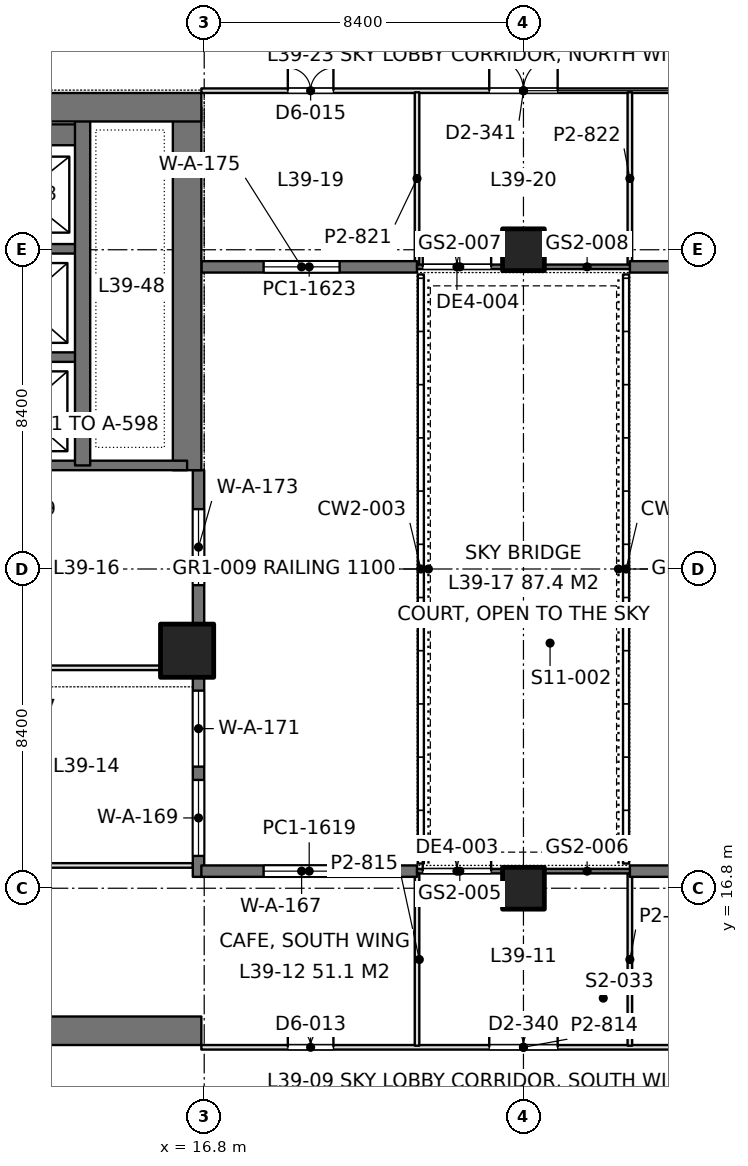
"""IFC4 building model, lengths in metres.
Left out: names, types, materials, properties, quantities, classifications, styles, units other than length and angle.
Written with IfcOpenShell. Run it as: python <this file> out.ifc"""

import sys

from ifc_helpers import new_model, si_unit, direction, frame, frame_2d, origin, origin_2d, place, context, subcontext, project, spatial, rectangle, extrude, element, fill, save


model = new_model("IFC4")
c1 = context("Model", 3, precision=1e-05, world=origin(), true_north=direction((0.0, 1.0)))
c2 = subcontext(c1, "Body", "Model", "MODEL_VIEW")
j1 = project(units=[si_unit("LENGTHUNIT", "METRE"), si_unit("PLANEANGLEUNIT", "RADIAN")], contexts=[c1])
p1 = place(None, origin())
s1 = spatial("IfcSite", under=j1, at=p1, CompositionType="ELEMENT")
p2 = place(p1, origin())
s2 = spatial("IfcBuilding", under=s1, at=p2, CompositionType="ELEMENT")
p3 = place(p2, frame((0.0, 0.0, 173.4)))
s3 = spatial("IfcBuildingStorey", under=s2, at=p3, CompositionType="ELEMENT", Elevation=173.4)
for number, where, z_axis, x_axis in (
    (1, (25.2, 16.8, 0.0), (0.0, 0.0, 1.0), (1.0, 0.0, 0.0)),
    (2, (25.2, 33.6, 0.0), (0.0, 0.0, 1.0), (1.0, 0.0, 0.0)),
):
    element("IfcColumn", number, at=place(p3, frame(where, z_axis=z_axis, x_axis=x_axis)), inside=s3, PredefinedType="COLUMN", context=c2, shape_type="SweptSolid", body=[
        extrude(rectangle(XDim=1.1, YDim=1.1, at=origin_2d()), origin(), (0.0, 0.0, 1.0), 4.2),
    ])
p4 = place(p3, frame((16.35, 23.05, 0.0), z_axis=(0.0, 0.0, 1.0), x_axis=(1.0, 0.0, 0.0)))
e3 = element("IfcColumn", 3, at=p4, inside=s3, PredefinedType="COLUMN", context=c2, shape_type="SweptSolid", body=[
    extrude(rectangle(XDim=1.4, YDim=1.4, at=origin_2d()), origin(), (0.0, 0.0, 1.0), 4.2),
])
p5 = place(p3, frame((-1.125, 13.05, 0.0), z_axis=(0.0, 0.0, 1.0), x_axis=(1.0, 0.0, 0.0)))
e4 = element("IfcWall", 4, at=p5, inside=s3, PredefinedType="SHEAR", context=c2, shape_type="SweptSolid", body=[
    extrude(rectangle(XDim=17.85, YDim=0.75, at=frame_2d((8.925, 0.0))), origin(), (0.0, 0.0, 1.0), 4.2),
])
p6 = place(p5, frame((8.875, 0.0, 0.0)))
e5 = element("IfcOpeningElement", 5, at=p6, cuts=e4, PredefinedType="OPENING", context=c2, shape_type="SweptSolid", body=[
    extrude(rectangle(XDim=1.8, YDim=2.4, at=frame_2d((0.9, 1.2))), frame((0.0, 0.385, 0.0), z_axis=(0.0, -1.0, 0.0), x_axis=(1.0, 0.0, 0.0)), (0.0, 0.0, 1.0), 0.77),
])
p7 = place(p3, frame((-1.125, 37.35, 0.0), z_axis=(0.0, 0.0, 1.0), x_axis=(1.0, 0.0, 0.0)))
e6 = element("IfcWall", 6, at=p7, inside=s3, PredefinedType="SHEAR", context=c2, shape_type="SweptSolid", body=[
    extrude(rectangle(XDim=17.85, YDim=0.75, at=frame_2d((8.925, 0.0))), origin(), (0.0, 0.0, 1.0), 4.2),
])
p8 = place(p7, frame((8.875, 0.0, 0.0)))
e7 = element("IfcOpeningElement", 7, at=p8, cuts=e6, PredefinedType="OPENING", context=c2, shape_type="SweptSolid", body=[
    extrude(rectangle(XDim=1.8, YDim=2.4, at=frame_2d((0.9, 1.2))), frame((0.0, 0.385, 0.0), z_axis=(0.0, -1.0, 0.0), x_axis=(1.0, 0.0, 0.0)), (0.0, 0.0, 1.0), 0.77),
])
p9 = place(p3, frame((16.35, 27.8, 0.0), z_axis=(0.0, 0.0, 1.0), x_axis=(0.0, 1.0, 0.0)))
e8 = element("IfcWall", 8, at=p9, inside=s3, PredefinedType="SHEAR", context=c2, shape_type="SweptSolid", body=[
    extrude(rectangle(XDim=9.55, YDim=0.75, at=frame_2d((4.775, 0.0))), origin(), (0.0, 0.0, 1.0), 4.2),
])
p10 = place(p3, frame((13.6, 27.925, 0.0), z_axis=(0.0, 0.0, 1.0), x_axis=(0.0, 1.0, 0.0)))
e9 = element("IfcWall", 9, at=p10, inside=s3, PredefinedType="SHEAR", context=c2, shape_type="SweptSolid", body=[
    extrude(rectangle(XDim=9.425, YDim=0.4, at=frame_2d((4.712, 0.0))), origin(), (0.0, 0.0, 1.0), 4.2),
])
p11 = place(p3, frame((10.4, 27.925, 0.0), z_axis=(0.0, 0.0, 1.0), x_axis=(1.0, 0.0, 0.0)))
e10 = element("IfcWall", 10, at=p11, inside=s3, PredefinedType="SHEAR", context=c2, shape_type="SweptSolid", body=[
    extrude(rectangle(XDim=5.95, YDim=0.25, at=frame_2d((2.975, 0.0))), origin(), (0.0, 0.0, 1.0), 4.2),
])
for number, where, z_axis, x_axis in (
    (11, (10.4, 30.775, 0.0), (0.0, 0.0, 1.0), (1.0, 0.0, 0.0)),
    (12, (10.4, 33.625, 0.0), (0.0, 0.0, 1.0), (1.0, 0.0, 0.0)),
):
    element("IfcWall", number, at=place(p3, frame(where, z_axis=z_axis, x_axis=x_axis)), inside=s3, PredefinedType="SHEAR", context=c2, shape_type="SweptSolid", body=[
        extrude(rectangle(XDim=3.2, YDim=0.25, at=frame_2d((1.6, 0.0))), origin(), (0.0, 0.0, 1.0), 4.2),
    ])
p12 = place(p3, frame((10.4, 36.625, 0.0), z_axis=(0.0, 0.0, 1.0), x_axis=(1.0, 0.0, 0.0)))
e13 = element("IfcWall", 13, at=p12, inside=s3, PredefinedType="SHEAR", context=c2, shape_type="SweptSolid", body=[
    extrude(rectangle(XDim=3.2, YDim=0.55, at=frame_2d((1.6, 0.0))), origin(), (0.0, 0.0, 1.0), 4.2),
])
p13 = place(p3, frame((16.65, 17.1, 0.0), z_axis=(0.0, 0.0, 1.0), x_axis=(0.0, 1.0, 0.0)))
e14 = element("IfcWall", 14, at=p13, inside=s3, PredefinedType="SOLIDWALL", context=c2, shape_type="SweptSolid", body=[
    extrude(rectangle(XDim=10.7, YDim=0.3, at=frame_2d((5.35, 0.0))), origin(), (0.0, 0.0, 1.0), 4.05),
])
p14 = place(p13, frame((0.55, 0.0, 0.1)))
e15 = element("IfcOpeningElement", 15, at=p14, cuts=e14, PredefinedType="OPENING", context=c2, shape_type="SweptSolid", body=[
    extrude(rectangle(XDim=2.0, YDim=3.0, at=frame_2d((1.0, 1.5))), frame((0.0, 0.16, 0.0), z_axis=(0.0, -1.0, 0.0), x_axis=(1.0, 0.0, 0.0)), (0.0, 0.0, 1.0), 0.32),
])
p15 = place(p13, frame((2.9, 0.0, 0.1)))
e16 = element("IfcOpeningElement", 16, at=p15, cuts=e14, PredefinedType="OPENING", context=c2, shape_type="SweptSolid", body=[
    extrude(rectangle(XDim=2.0, YDim=3.0, at=frame_2d((1.0, 1.5))), frame((0.0, 0.16, 0.0), z_axis=(0.0, -1.0, 0.0), x_axis=(1.0, 0.0, 0.0)), (0.0, 0.0, 1.0), 0.32),
])
p16 = place(p13, frame((7.675, 0.0, 0.1)))
e17 = element("IfcOpeningElement", 17, at=p16, cuts=e14, PredefinedType="OPENING", context=c2, shape_type="SweptSolid", body=[
    extrude(rectangle(XDim=2.0, YDim=3.0, at=frame_2d((1.0, 1.5))), frame((0.0, 0.16, 0.0), z_axis=(0.0, -1.0, 0.0), x_axis=(1.0, 0.0, 0.0)), (0.0, 0.0, 1.0), 0.32),
])
p17 = place(p3, frame((16.725, 17.25, 0.0), z_axis=(0.0, 0.0, 1.0), x_axis=(1.0, 0.0, 0.0)))
e18 = element("IfcWall", 18, at=p17, inside=s3, PredefinedType="SOLIDWALL", context=c2, shape_type="SweptSolid", body=[
    extrude(rectangle(XDim=5.675, YDim=0.3, at=frame_2d((2.837, 0.0))), origin(), (0.0, 0.0, 1.0), 4.05),
])
p18 = place(p17, frame((1.637, 0.0, 0.1)))
e19 = element("IfcOpeningElement", 19, at=p18, cuts=e18, PredefinedType="OPENING", context=c2, shape_type="SweptSolid", body=[
    extrude(rectangle(XDim=2.0, YDim=3.0, at=frame_2d((1.0, 1.5))), frame((0.0, 0.16, 0.0), z_axis=(0.0, -1.0, 0.0), x_axis=(1.0, 0.0, 0.0)), (0.0, 0.0, 1.0), 0.32),
])
p19 = place(p3, frame((22.4, 17.25, 0.0), z_axis=(0.0, 0.0, 1.0), x_axis=(1.0, 0.0, 0.0)))
e20 = element("IfcWall", 20, at=p19, inside=s3, PredefinedType="SOLIDWALL", context=c2, shape_type="SweptSolid", body=[
    extrude(rectangle(XDim=2.25, YDim=0.12, at=frame_2d((1.125, 0.0))), origin(), (0.0, 0.0, 1.0), 4.05),
])
p20 = place(p19, frame((0.15, 0.0, 0.0)))
e21 = element("IfcOpeningElement", 21, at=p20, cuts=e20, PredefinedType="OPENING", context=c2, shape_type="SweptSolid", body=[
    extrude(rectangle(XDim=1.8, YDim=2.4, at=frame_2d((0.9, 1.2))), frame((0.0, 0.07, 0.0), z_axis=(0.0, -1.0, 0.0), x_axis=(1.0, 0.0, 0.0)), (0.0, 0.0, 1.0), 0.14),
])
p21 = place(p3, frame((25.75, 17.25, 0.0), z_axis=(0.0, 0.0, 1.0), x_axis=(1.0, 0.0, 0.0)))
e22 = element("IfcWall", 22, at=p21, inside=s3, PredefinedType="SOLIDWALL", context=c2, shape_type="SweptSolid", body=[
    extrude(rectangle(XDim=2.25, YDim=0.12, at=frame_2d((1.125, 0.0))), origin(), (0.0, 0.0, 1.0), 4.05),
])
p22 = place(p3, frame((28.0, 17.25, 0.0), z_axis=(0.0, 0.0, 1.0), x_axis=(1.0, 0.0, 0.0)))
e23 = element("IfcWall", 23, at=p22, inside=s3, PredefinedType="SOLIDWALL", context=c2, shape_type="SweptSolid", body=[
    extrude(rectangle(XDim=5.675, YDim=0.3, at=frame_2d((2.837, 0.0))), origin(), (0.0, 0.0, 1.0), 4.05),
])
p23 = place(p22, frame((1.637, 0.0, 0.1)))
e24 = element("IfcOpeningElement", 24, at=p23, cuts=e23, PredefinedType="OPENING", context=c2, shape_type="SweptSolid", body=[
    extrude(rectangle(XDim=2.0, YDim=3.0, at=frame_2d((1.0, 1.5))), frame((0.0, 0.16, 0.0), z_axis=(0.0, -1.0, 0.0), x_axis=(1.0, 0.0, 0.0)), (0.0, 0.0, 1.0), 0.32),
])
p24 = place(p3, frame((16.725, 33.15, 0.0), z_axis=(0.0, 0.0, 1.0), x_axis=(1.0, 0.0, 0.0)))
e25 = element("IfcWall", 25, at=p24, inside=s3, PredefinedType="SOLIDWALL", context=c2, shape_type="SweptSolid", body=[
    extrude(rectangle(XDim=5.675, YDim=0.3, at=frame_2d((2.837, 0.0))), origin(), (0.0, 0.0, 1.0), 4.05),
])
p25 = place(p24, frame((1.637, 0.0, 0.1)))
e26 = element("IfcOpeningElement", 26, at=p25, cuts=e25, PredefinedType="OPENING", context=c2, shape_type="SweptSolid", body=[
    extrude(rectangle(XDim=2.0, YDim=3.0, at=frame_2d((1.0, 1.5))), frame((0.0, 0.16, 0.0), z_axis=(0.0, -1.0, 0.0), x_axis=(1.0, 0.0, 0.0)), (0.0, 0.0, 1.0), 0.32),
])
p26 = place(p3, frame((22.4, 33.15, 0.0), z_axis=(0.0, 0.0, 1.0), x_axis=(1.0, 0.0, 0.0)))
e27 = element("IfcWall", 27, at=p26, inside=s3, PredefinedType="SOLIDWALL", context=c2, shape_type="SweptSolid", body=[
    extrude(rectangle(XDim=2.25, YDim=0.12, at=frame_2d((1.125, 0.0))), origin(), (0.0, 0.0, 1.0), 4.05),
])
p27 = place(p26, frame((0.15, 0.0, 0.0)))
e28 = element("IfcOpeningElement", 28, at=p27, cuts=e27, PredefinedType="OPENING", context=c2, shape_type="SweptSolid", body=[
    extrude(rectangle(XDim=1.8, YDim=2.4, at=frame_2d((0.9, 1.2))), frame((0.0, 0.07, 0.0), z_axis=(0.0, -1.0, 0.0), x_axis=(1.0, 0.0, 0.0)), (0.0, 0.0, 1.0), 0.14),
])
p28 = place(p3, frame((25.75, 33.15, 0.0), z_axis=(0.0, 0.0, 1.0), x_axis=(1.0, 0.0, 0.0)))
e29 = element("IfcWall", 29, at=p28, inside=s3, PredefinedType="SOLIDWALL", context=c2, shape_type="SweptSolid", body=[
    extrude(rectangle(XDim=2.25, YDim=0.12, at=frame_2d((1.125, 0.0))), origin(), (0.0, 0.0, 1.0), 4.05),
])
p29 = place(p3, frame((28.0, 33.15, 0.0), z_axis=(0.0, 0.0, 1.0), x_axis=(1.0, 0.0, 0.0)))
e30 = element("IfcWall", 30, at=p29, inside=s3, PredefinedType="SOLIDWALL", context=c2, shape_type="SweptSolid", body=[
    extrude(rectangle(XDim=5.675, YDim=0.3, at=frame_2d((2.837, 0.0))), origin(), (0.0, 0.0, 1.0), 4.05),
])
p30 = place(p29, frame((1.637, 0.0, 0.1)))
e31 = element("IfcOpeningElement", 31, at=p30, cuts=e30, PredefinedType="OPENING", context=c2, shape_type="SweptSolid", body=[
    extrude(rectangle(XDim=2.0, YDim=3.0, at=frame_2d((1.0, 1.5))), frame((0.0, 0.16, 0.0), z_axis=(0.0, -1.0, 0.0), x_axis=(1.0, 0.0, 0.0)), (0.0, 0.0, 1.0), 0.32),
])
p31 = place(p3, frame((10.598, 17.4, 0.0), z_axis=(0.0, 0.0, 1.0), x_axis=(1.0, 0.0, 0.0)))
e32 = element("IfcWall", 32, at=p31, inside=s3, PredefinedType="PARTITIONING", context=c2, shape_type="SweptSolid", body=[
    extrude(rectangle(XDim=5.904, YDim=0.12, at=frame_2d((2.952, 0.0))), origin(), (0.0, 0.0, 1.0), 3.55),
])
p32 = place(p3, frame((10.598, 22.6, 0.0), z_axis=(0.0, 0.0, 1.0), x_axis=(1.0, 0.0, 0.0)))
e33 = element("IfcWall", 33, at=p32, inside=s3, PredefinedType="PARTITIONING", context=c2, shape_type="SweptSolid", body=[
    extrude(rectangle(XDim=5.053, YDim=0.12, at=frame_2d((2.526, 0.0))), origin(), (0.0, 0.0, 1.0), 4.05),
])
p33 = place(p3, frame((16.725, 12.615, 0.0), z_axis=(0.0, 0.0, 1.0), x_axis=(1.0, 0.0, 0.0)))
e34 = element("IfcWall", 34, at=p33, inside=s3, PredefinedType="PARTITIONING", context=c2, shape_type="SweptSolid", body=[
    extrude(rectangle(XDim=16.95, YDim=0.12, at=frame_2d((8.475, 0.0))), origin(), (0.0, 0.0, 1.0), 3.55),
])
p34 = place(p33, frame((2.275, 0.0, 0.0)))
e35 = element("IfcOpeningElement", 35, at=p34, cuts=e34, PredefinedType="OPENING", context=c2, shape_type="SweptSolid", body=[
    extrude(rectangle(XDim=1.2, YDim=2.2, at=frame_2d((0.6, 1.1))), frame((0.0, 0.07, 0.0), z_axis=(0.0, -1.0, 0.0), x_axis=(1.0, 0.0, 0.0)), (0.0, 0.0, 1.0), 0.14),
])
p35 = place(p33, frame((7.575, 0.0, 0.0)))
e36 = element("IfcOpeningElement", 36, at=p35, cuts=e34, PredefinedType="OPENING", context=c2, shape_type="SweptSolid", body=[
    extrude(rectangle(XDim=1.8, YDim=2.2, at=frame_2d((0.9, 1.1))), frame((0.0, 0.07, 0.0), z_axis=(0.0, -1.0, 0.0), x_axis=(1.0, 0.0, 0.0)), (0.0, 0.0, 1.0), 0.14),
])
p36 = place(p33, frame((13.475, 0.0, 0.0)))
e37 = element("IfcOpeningElement", 37, at=p36, cuts=e34, PredefinedType="OPENING", context=c2, shape_type="SweptSolid", body=[
    extrude(rectangle(XDim=1.2, YDim=2.2, at=frame_2d((0.6, 1.1))), frame((0.0, 0.07, 0.0), z_axis=(0.0, -1.0, 0.0), x_axis=(1.0, 0.0, 0.0)), (0.0, 0.0, 1.0), 0.14),
])
for number, where, z_axis, x_axis in (
    (38, (22.4, 12.658, 0.0), (0.0, 0.0, 1.0), (0.0, 1.0, 0.0)),
    (39, (28.0, 12.658, 0.0), (0.0, 0.0, 1.0), (0.0, 1.0, 0.0)),
):
    element("IfcWall", number, at=place(p3, frame(where, z_axis=z_axis, x_axis=x_axis)), inside=s3, PredefinedType="PARTITIONING", context=c2, shape_type="SweptSolid", body=[
        extrude(rectangle(XDim=4.534, YDim=0.12, at=frame_2d((2.267, 0.0))), origin(), (0.0, 0.0, 1.0), 3.2),
    ])
p37 = place(p3, frame((16.725, 37.785, 0.0), z_axis=(0.0, 0.0, 1.0), x_axis=(1.0, 0.0, 0.0)))
e40 = element("IfcWall", 40, at=p37, inside=s3, PredefinedType="PARTITIONING", context=c2, shape_type="SweptSolid", body=[
    extrude(rectangle(XDim=16.95, YDim=0.12, at=frame_2d((8.475, 0.0))), origin(), (0.0, 0.0, 1.0), 3.55),
])
p38 = place(p37, frame((2.275, 0.0, 0.0)))
e41 = element("IfcOpeningElement", 41, at=p38, cuts=e40, PredefinedType="OPENING", context=c2, shape_type="SweptSolid", body=[
    extrude(rectangle(XDim=1.2, YDim=2.2, at=frame_2d((0.6, 1.1))), frame((0.0, 0.07, 0.0), z_axis=(0.0, -1.0, 0.0), x_axis=(1.0, 0.0, 0.0)), (0.0, 0.0, 1.0), 0.14),
])
p39 = place(p37, frame((7.575, 0.0, 0.0)))
e42 = element("IfcOpeningElement", 42, at=p39, cuts=e40, PredefinedType="OPENING", context=c2, shape_type="SweptSolid", body=[
    extrude(rectangle(XDim=1.8, YDim=2.2, at=frame_2d((0.9, 1.1))), frame((0.0, 0.07, 0.0), z_axis=(0.0, -1.0, 0.0), x_axis=(1.0, 0.0, 0.0)), (0.0, 0.0, 1.0), 0.14),
])
p40 = place(p37, frame((13.475, 0.0, 0.0)))
e43 = element("IfcOpeningElement", 43, at=p40, cuts=e40, PredefinedType="OPENING", context=c2, shape_type="SweptSolid", body=[
    extrude(rectangle(XDim=1.2, YDim=2.2, at=frame_2d((0.6, 1.1))), frame((0.0, 0.07, 0.0), z_axis=(0.0, -1.0, 0.0), x_axis=(1.0, 0.0, 0.0)), (0.0, 0.0, 1.0), 0.14),
])
for number, where, z_axis, x_axis in (
    (44, (22.4, 33.208, 0.0), (0.0, 0.0, 1.0), (0.0, 1.0, 0.0)),
    (45, (28.0, 33.208, 0.0), (0.0, 0.0, 1.0), (0.0, 1.0, 0.0)),
):
    element("IfcWall", number, at=place(p3, frame(where, z_axis=z_axis, x_axis=x_axis)), inside=s3, PredefinedType="PARTITIONING", context=c2, shape_type="SweptSolid", body=[
        extrude(rectangle(XDim=4.534, YDim=0.12, at=frame_2d((2.267, 0.0))), origin(), (0.0, 0.0, 1.0), 3.2),
    ])
p41 = place(p14, origin())
e46 = element("IfcWindow", 46, at=p41, inside=s3, PartitioningType="SINGLE_PANEL", PredefinedType="WINDOW", context=c2, shape_type="SweptSolid", body=[
    extrude(rectangle(XDim=2.0, YDim=3.0, at=frame_2d((1.0, 1.5))), frame((0.0, 0.03, 0.0), z_axis=(0.0, -1.0, 0.0), x_axis=(1.0, 0.0, 0.0)), (0.0, 0.0, 1.0), 0.06),
])
fill(e15, e46)
p42 = place(p15, origin())
e47 = element("IfcWindow", 47, at=p42, inside=s3, PartitioningType="SINGLE_PANEL", PredefinedType="WINDOW", context=c2, shape_type="SweptSolid", body=[
    extrude(rectangle(XDim=2.0, YDim=3.0, at=frame_2d((1.0, 1.5))), frame((0.0, 0.03, 0.0), z_axis=(0.0, -1.0, 0.0), x_axis=(1.0, 0.0, 0.0)), (0.0, 0.0, 1.0), 0.06),
])
fill(e16, e47)
p43 = place(p16, origin())
e48 = element("IfcWindow", 48, at=p43, inside=s3, PartitioningType="SINGLE_PANEL", PredefinedType="WINDOW", context=c2, shape_type="SweptSolid", body=[
    extrude(rectangle(XDim=2.0, YDim=3.0, at=frame_2d((1.0, 1.5))), frame((0.0, 0.03, 0.0), z_axis=(0.0, -1.0, 0.0), x_axis=(1.0, 0.0, 0.0)), (0.0, 0.0, 1.0), 0.06),
])
fill(e17, e48)
p44 = place(p18, origin())
e49 = element("IfcWindow", 49, at=p44, inside=s3, PartitioningType="SINGLE_PANEL", PredefinedType="WINDOW", context=c2, shape_type="SweptSolid", body=[
    extrude(rectangle(XDim=2.0, YDim=3.0, at=frame_2d((1.0, 1.5))), frame((0.0, 0.03, 0.0), z_axis=(0.0, -1.0, 0.0), x_axis=(1.0, 0.0, 0.0)), (0.0, 0.0, 1.0), 0.06),
])
fill(e19, e49)
p45 = place(p20, origin())
e50 = element("IfcDoor", 50, at=p45, inside=s3, OperationType="DOUBLE_DOOR_SINGLE_SWING", PredefinedType="DOOR", context=c2, shape_type="SweptSolid", body=[
    extrude(rectangle(XDim=1.8, YDim=2.4, at=frame_2d((0.9, 1.2))), frame((0.0, 0.025, 0.0), z_axis=(0.0, -1.0, 0.0), x_axis=(1.0, 0.0, 0.0)), (0.0, 0.0, 1.0), 0.05),
])
fill(e21, e50)
p46 = place(p25, origin())
e51 = element("IfcWindow", 51, at=p46, inside=s3, PartitioningType="SINGLE_PANEL", PredefinedType="WINDOW", context=c2, shape_type="SweptSolid", body=[
    extrude(rectangle(XDim=2.0, YDim=3.0, at=frame_2d((1.0, 1.5))), frame((0.0, 0.03, 0.0), z_axis=(0.0, -1.0, 0.0), x_axis=(1.0, 0.0, 0.0)), (0.0, 0.0, 1.0), 0.06),
])
fill(e26, e51)
p47 = place(p27, origin())
e52 = element("IfcDoor", 52, at=p47, inside=s3, OperationType="DOUBLE_DOOR_SINGLE_SWING", PredefinedType="DOOR", context=c2, shape_type="SweptSolid", body=[
    extrude(rectangle(XDim=1.8, YDim=2.4, at=frame_2d((0.9, 1.2))), frame((0.0, 0.025, 0.0), z_axis=(0.0, -1.0, 0.0), x_axis=(1.0, 0.0, 0.0)), (0.0, 0.0, 1.0), 0.05),
])
fill(e28, e52)
p48 = place(p34, origin())
e53 = element("IfcDoor", 53, at=p48, inside=s3, OperationType="DOUBLE_DOOR_SINGLE_SWING_OPPOSITE_LEFT", PredefinedType="DOOR", context=c2, shape_type="SweptSolid", body=[
    extrude(rectangle(XDim=1.2, YDim=2.2, at=frame_2d((0.6, 1.1))), frame((0.0, 0.025, 0.0), z_axis=(0.0, -1.0, 0.0), x_axis=(1.0, 0.0, 0.0)), (0.0, 0.0, 1.0), 0.05),
])
fill(e35, e53)
p49 = place(p35, origin())
e54 = element("IfcDoor", 54, at=p49, inside=s3, OperationType="DOUBLE_DOOR_SINGLE_SWING", PredefinedType="DOOR", context=c2, shape_type="SweptSolid", body=[
    extrude(rectangle(XDim=1.8, YDim=2.2, at=frame_2d((0.9, 1.1))), frame((0.0, 0.025, 0.0), z_axis=(0.0, -1.0, 0.0), x_axis=(1.0, 0.0, 0.0)), (0.0, 0.0, 1.0), 0.05),
])
fill(e36, e54)
p50 = place(p38, origin())
e55 = element("IfcDoor", 55, at=p50, inside=s3, OperationType="DOUBLE_DOOR_SINGLE_SWING_OPPOSITE_LEFT", PredefinedType="DOOR", context=c2, shape_type="SweptSolid", body=[
    extrude(rectangle(XDim=1.2, YDim=2.2, at=frame_2d((0.6, 1.1))), frame((0.0, 0.025, 0.0), z_axis=(0.0, -1.0, 0.0), x_axis=(1.0, 0.0, 0.0)), (0.0, 0.0, 1.0), 0.05),
])
fill(e41, e55)
p51 = place(p39, origin())
e56 = element("IfcDoor", 56, at=p51, inside=s3, OperationType="DOUBLE_DOOR_SINGLE_SWING", PredefinedType="DOOR", context=c2, shape_type="SweptSolid", body=[
    extrude(rectangle(XDim=1.8, YDim=2.2, at=frame_2d((0.9, 1.1))), frame((0.0, 0.025, 0.0), z_axis=(0.0, -1.0, 0.0), x_axis=(1.0, 0.0, 0.0)), (0.0, 0.0, 1.0), 0.05),
])
fill(e42, e56)
save(model, sys.argv[1])
